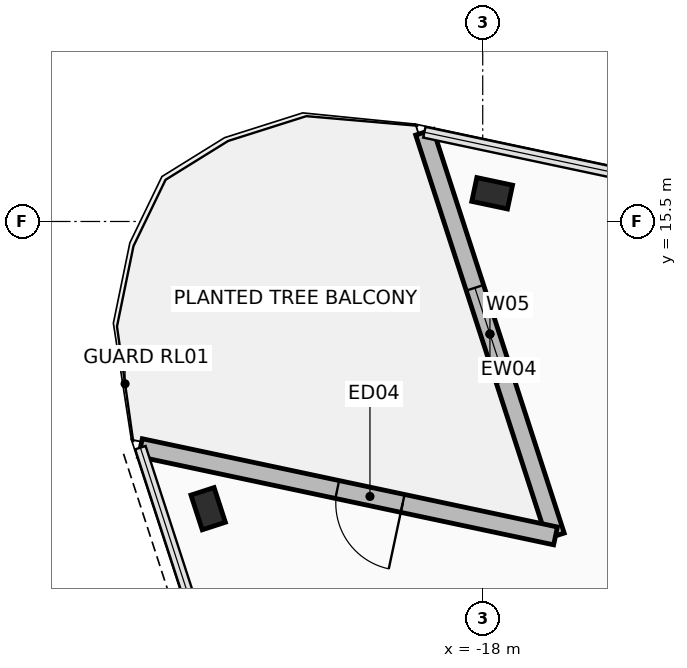
"""IFC4 building model, lengths in metres.
Left out: names, types, materials, properties, quantities, classifications, styles, units other than length and angle.
Written with IfcOpenShell. Run it as: python <this file> out.ifc"""

import sys

from ifc_helpers import new_model, si_unit, direction, frame, frame_2d, origin, origin_2d, place, context, subcontext, project, spatial, rectangle, hollow_rectangle, extrude, element, fill, save


model = new_model("IFC4")
c1 = context("Model", 3, precision=1e-05, world=origin(), true_north=direction((0.0, 1.0)))
c2 = subcontext(c1, "Body", "Model", "MODEL_VIEW")
j1 = project(units=[si_unit("LENGTHUNIT", "METRE"), si_unit("PLANEANGLEUNIT", "RADIAN")], contexts=[c1])
p1 = place(None, origin())
s1 = spatial("IfcSite", under=j1, at=p1, CompositionType="ELEMENT")
p2 = place(p1, origin())
s2 = spatial("IfcBuilding", under=s1, at=p2, CompositionType="ELEMENT")
p3 = place(p2, frame((0.0, 0.0, 211.25)))
s3 = spatial("IfcBuildingStorey", under=s2, at=p3, CompositionType="ELEMENT", Elevation=211.25)
for number, where, z_axis, x_axis in (
    (1, (-22.515, 10.777, 0.0), (0.0, 0.0, 1.0), (-0.309, 0.951, 0.0)),
    (2, (-17.845, 15.964, 0.0), (0.0, 0.0, 1.0), (-0.978, 0.208, 0.0)),
):
    element("IfcColumn", number, at=place(p3, frame(where, z_axis=z_axis, x_axis=x_axis)), inside=s3, PredefinedType="COLUMN", context=c2, shape_type="SweptSolid", body=[
        extrude(hollow_rectangle(XDim=0.4, YDim=0.6, WallThickness=0.03, at=origin_2d()), origin(), (0.0, 0.0, 1.0), 3.6),
    ])
p4 = place(p3, frame((-18.96, 16.968, 0.0), z_axis=(0.0, 0.0, 1.0), x_axis=(0.309030708092, -0.951052060329, 0.0)))
e3 = element("IfcWall", 3, at=p4, inside=s3, PredefinedType="STANDARD", context=c2, shape_type="SweptSolid", body=[
    extrude(rectangle(XDim=6.98, YDim=0.3, at=frame_2d((3.49, 0.0))), origin(), (0.0, 0.0, 1.0), 2.715),
])
p5 = place(p4, frame((2.69, 0.0, 0.335)))
e4 = element("IfcOpeningElement", 4, at=p5, cuts=e3, PredefinedType="OPENING", context=c2, shape_type="SweptSolid", body=[
    extrude(rectangle(XDim=1.6, YDim=2.2, at=frame_2d((0.8, 1.1))), frame((0.0, 0.16, 0.0), z_axis=(0.0, -1.0, 0.0), x_axis=(1.0, 0.0, 0.0)), (0.0, 0.0, 1.0), 0.32),
])
p6 = place(p3, frame((-16.803, 10.329, 0.0), z_axis=(0.0, 0.0, 1.0), x_axis=(-0.9781486268, 0.207906863497, 0.0)))
e5 = element("IfcWall", 5, at=p6, inside=s3, PredefinedType="STANDARD", context=c2, shape_type="SweptSolid", body=[
    extrude(rectangle(XDim=6.98, YDim=0.3, at=frame_2d((3.49, 0.0))), origin(), (0.0, 0.0, 1.0), 2.715),
])
p7 = place(p6, frame((2.57, 0.0, 0.0)))
e6 = element("IfcOpeningElement", 6, at=p7, cuts=e5, PredefinedType="OPENING", context=c2, shape_type="SweptSolid", body=[
    extrude(rectangle(XDim=1.1, YDim=2.2, at=frame_2d((0.55, 1.1))), frame((0.0, 0.16, 0.0), z_axis=(0.0, -1.0, 0.0), x_axis=(1.0, 0.0, 0.0)), (0.0, 0.0, 1.0), 0.32),
])
p8 = place(p7, origin())
e7 = element("IfcDoor", 7, at=p8, inside=s3, OperationType="SINGLE_SWING_LEFT", PredefinedType="DOOR", context=c2, shape_type="SweptSolid", body=[
    extrude(rectangle(XDim=1.1, YDim=2.2, at=frame_2d((0.55, 1.1))), frame((0.0, 0.025, 0.0), z_axis=(0.0, -1.0, 0.0), x_axis=(1.0, 0.0, 0.0)), (0.0, 0.0, 1.0), 0.05),
])
fill(e6, e7)
p9 = place(p5, origin())
e8 = element("IfcWindow", 8, at=p9, inside=s3, PartitioningType="SINGLE_PANEL", PredefinedType="WINDOW", context=c2, shape_type="SweptSolid", body=[
    extrude(rectangle(XDim=1.6, YDim=2.2, at=frame_2d((0.8, 1.1))), frame((0.0, 0.03, 0.0), z_axis=(0.0, -1.0, 0.0), x_axis=(1.0, 0.0, 0.0)), (0.0, 0.0, 1.0), 0.06),
])
fill(e4, e8)
save(model, sys.argv[1])
